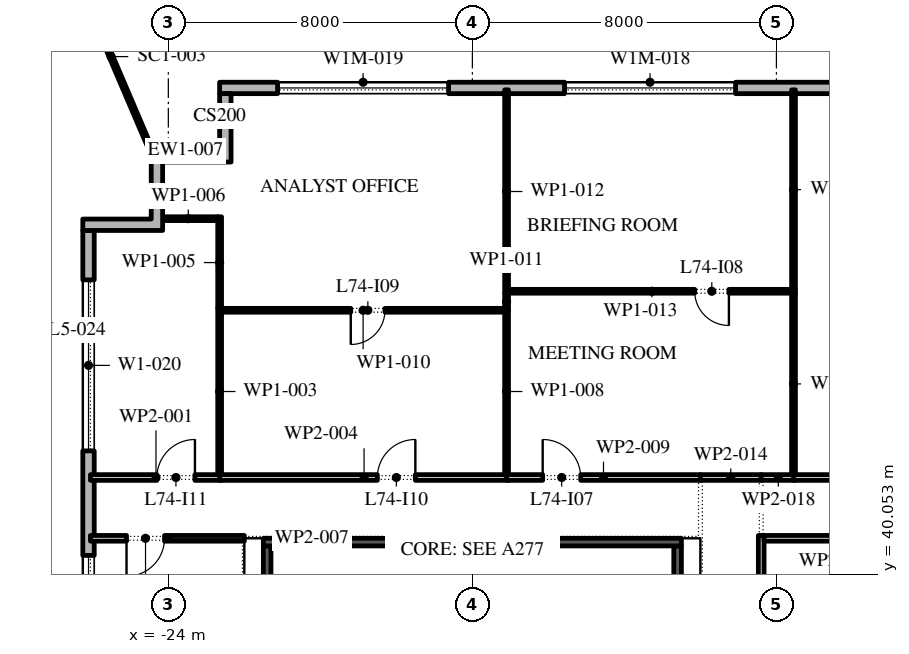
"""IFC4 building model, lengths in metres.
Left out: names, types, materials, properties, quantities, classifications, styles, units other than length and angle.
Written with IfcOpenShell. Run it as: python <this file> out.ifc"""

import sys

from ifc_helpers import new_model, si_unit, direction, frame, frame_2d, origin, place, context, subcontext, project, spatial, polyline, rectangle, outline, extrude, element, fill, save


model = new_model("IFC4")
c1 = context("Model", 3, precision=1e-05, world=origin(), true_north=direction((0.0, 1.0)))
c2 = subcontext(c1, "Body", "Model", "MODEL_VIEW")
j1 = project(units=[si_unit("LENGTHUNIT", "METRE"), si_unit("PLANEANGLEUNIT", "RADIAN")], contexts=[c1])
p1 = place(None, origin())
s1 = spatial("IfcSite", under=j1, at=p1, CompositionType="ELEMENT")
p2 = place(p1, origin())
s2 = spatial("IfcBuilding", under=s1, at=p2, CompositionType="ELEMENT")
p3 = place(p2, frame((0.0, 0.0, 338.4)))
s3 = spatial("IfcBuildingStorey", under=s2, at=p3, CompositionType="ELEMENT", Elevation=338.4)
p4 = place(p3, frame((22.35, 52.85, 0.0), z_axis=(0.0, 0.0, 1.0), x_axis=(-1.0, 0.0, 0.0)))
e1 = element("IfcWall", 1, at=p4, inside=s3, PredefinedType="STANDARD", context=c2, shape_type="SweptSolid", body=[
    extrude(rectangle(XDim=45.0, YDim=0.3, at=frame_2d((22.5, 0.0))), origin(), (0.0, 0.0, 1.0), 4.0),
])
p5 = place(p4, frame((1.375, 0.0, 0.45)))
e2 = element("IfcOpeningElement", 2, at=p5, cuts=e1, PredefinedType="OPENING", context=c2, shape_type="SweptSolid", body=[
    extrude(rectangle(XDim=4.5, YDim=2.575, at=frame_2d((2.25, 1.288))), frame((0.0, 0.16, 0.0), z_axis=(0.0, -1.0, 0.0), x_axis=(1.0, 0.0, 0.0)), (0.0, 0.0, 1.0), 0.32),
])
p6 = place(p4, frame((8.775, 0.0, 0.45)))
e3 = element("IfcOpeningElement", 3, at=p6, cuts=e1, PredefinedType="OPENING", context=c2, shape_type="SweptSolid", body=[
    extrude(rectangle(XDim=4.5, YDim=2.575, at=frame_2d((2.25, 1.288))), frame((0.0, 0.16, 0.0), z_axis=(0.0, -1.0, 0.0), x_axis=(1.0, 0.0, 0.0)), (0.0, 0.0, 1.0), 0.32),
])
p7 = place(p4, frame((17.375, 0.0, 0.0)))
e4 = element("IfcOpeningElement", 4, at=p7, cuts=e1, PredefinedType="OPENING", context=c2, shape_type="SweptSolid", body=[
    extrude(rectangle(XDim=2.4, YDim=3.025, at=frame_2d((1.2, 1.512))), frame((0.0, 0.16, 0.0), z_axis=(0.0, -1.0, 0.0), x_axis=(1.0, 0.0, 0.0)), (0.0, 0.0, 1.0), 0.32),
])
p8 = place(p4, frame((23.875, 0.0, 0.45)))
e5 = element("IfcOpeningElement", 5, at=p8, cuts=e1, PredefinedType="OPENING", context=c2, shape_type="SweptSolid", body=[
    extrude(rectangle(XDim=4.5, YDim=2.575, at=frame_2d((2.25, 1.288))), frame((0.0, 0.16, 0.0), z_axis=(0.0, -1.0, 0.0), x_axis=(1.0, 0.0, 0.0)), (0.0, 0.0, 1.0), 0.32),
])
p9 = place(p4, frame((31.425, 0.0, 0.45)))
e6 = element("IfcOpeningElement", 6, at=p9, cuts=e1, PredefinedType="OPENING", context=c2, shape_type="SweptSolid", body=[
    extrude(rectangle(XDim=4.5, YDim=2.575, at=frame_2d((2.25, 1.288))), frame((0.0, 0.16, 0.0), z_axis=(0.0, -1.0, 0.0), x_axis=(1.0, 0.0, 0.0)), (0.0, 0.0, 1.0), 0.32),
])
p10 = place(p4, frame((38.975, 0.0, 0.45)))
e7 = element("IfcOpeningElement", 7, at=p10, cuts=e1, PredefinedType="OPENING", context=c2, shape_type="SweptSolid", body=[
    extrude(rectangle(XDim=4.5, YDim=2.575, at=frame_2d((2.25, 1.288))), frame((0.0, 0.16, 0.0), z_axis=(0.0, -1.0, 0.0), x_axis=(1.0, 0.0, 0.0)), (0.0, 0.0, 1.0), 0.32),
])
p11 = place(p3, frame((-26.1, 49.1, 0.0), z_axis=(0.0, 0.0, 1.0), x_axis=(0.0, -1.0, 0.0)))
e8 = element("IfcWall", 8, at=p11, inside=s3, PredefinedType="STANDARD", context=c2, shape_type="SweptSolid", body=[
    extrude(rectangle(XDim=51.5, YDim=0.3, at=frame_2d((25.75, 0.0))), origin(), (0.0, 0.0, 1.0), 4.0),
])
p12 = place(p11, frame((1.3, 0.0, 0.45)))
e9 = element("IfcOpeningElement", 9, at=p12, cuts=e8, PredefinedType="OPENING", context=c2, shape_type="SweptSolid", body=[
    extrude(rectangle(XDim=4.5, YDim=3.05, at=frame_2d((2.25, 1.525))), frame((0.0, 0.16, 0.0), z_axis=(0.0, -1.0, 0.0), x_axis=(1.0, 0.0, 0.0)), (0.0, 0.0, 1.0), 0.32),
])
p13 = place(p11, frame((8.55, 0.0, 0.45)))
e10 = element("IfcOpeningElement", 10, at=p13, cuts=e8, PredefinedType="OPENING", context=c2, shape_type="SweptSolid", body=[
    extrude(rectangle(XDim=4.5, YDim=3.05, at=frame_2d((2.25, 1.525))), frame((0.0, 0.16, 0.0), z_axis=(0.0, -1.0, 0.0), x_axis=(1.0, 0.0, 0.0)), (0.0, 0.0, 1.0), 0.32),
])
p14 = place(p11, frame((17.0, 0.0, 0.0)))
e11 = element("IfcOpeningElement", 11, at=p14, cuts=e8, PredefinedType="OPENING", context=c2, shape_type="SweptSolid", body=[
    extrude(rectangle(XDim=2.4, YDim=3.5, at=frame_2d((1.2, 1.75))), frame((0.0, 0.16, 0.0), z_axis=(0.0, -1.0, 0.0), x_axis=(1.0, 0.0, 0.0)), (0.0, 0.0, 1.0), 0.32),
])
p15 = place(p11, frame((23.35, 0.0, 0.45)))
e12 = element("IfcOpeningElement", 12, at=p15, cuts=e8, PredefinedType="OPENING", context=c2, shape_type="SweptSolid", body=[
    extrude(rectangle(XDim=4.5, YDim=3.05, at=frame_2d((2.25, 1.525))), frame((0.0, 0.16, 0.0), z_axis=(0.0, -1.0, 0.0), x_axis=(1.0, 0.0, 0.0)), (0.0, 0.0, 1.0), 0.32),
])
p16 = place(p11, frame((30.75, 0.0, 0.45)))
e13 = element("IfcOpeningElement", 13, at=p16, cuts=e8, PredefinedType="OPENING", context=c2, shape_type="SweptSolid", body=[
    extrude(rectangle(XDim=4.5, YDim=3.05, at=frame_2d((2.25, 1.525))), frame((0.0, 0.16, 0.0), z_axis=(0.0, -1.0, 0.0), x_axis=(1.0, 0.0, 0.0)), (0.0, 0.0, 1.0), 0.32),
])
p17 = place(p11, frame((38.15, 0.0, 0.45)))
e14 = element("IfcOpeningElement", 14, at=p17, cuts=e8, PredefinedType="OPENING", context=c2, shape_type="SweptSolid", body=[
    extrude(rectangle(XDim=4.5, YDim=3.05, at=frame_2d((2.25, 1.525))), frame((0.0, 0.16, 0.0), z_axis=(0.0, -1.0, 0.0), x_axis=(1.0, 0.0, 0.0)), (0.0, 0.0, 1.0), 0.32),
])
p18 = place(p11, frame((46.6, 0.0, 0.0)))
e15 = element("IfcOpeningElement", 15, at=p18, cuts=e8, PredefinedType="OPENING", context=c2, shape_type="SweptSolid", body=[
    extrude(rectangle(XDim=2.4, YDim=3.5, at=frame_2d((1.2, 1.75))), frame((0.0, 0.16, 0.0), z_axis=(0.0, -1.0, 0.0), x_axis=(1.0, 0.0, 0.0)), (0.0, 0.0, 1.0), 0.32),
])
p19 = place(p3, origin())
e16 = element("IfcWall", 16, at=p19, inside=s3, PredefinedType="STANDARD", context=c2, shape_type="SweptSolid", body=[
    extrude(outline(polyline([(-24.45, 49.4), (-24.45, 51.2), (-22.65, 51.2), (-22.65, 52.7), (-22.35, 52.7), (-22.35, 50.9), (-24.15, 50.9), (-24.15, 49.1), (-26.25, 49.1), (-26.25, 49.4), (-24.45, 49.4)])), origin(), (0.0, 0.0, 1.0), 4.0),
])
p20 = place(p3, frame((-24.45, 51.2, -0.05), z_axis=(0.0, 0.0, 1.0), x_axis=(-0.392867927022, 0.919594906422, 0.0)))
e17 = element("IfcWall", 17, at=p20, inside=s3, PredefinedType="STANDARD", context=c2, shape_type="SweptSolid", body=[
    extrude(rectangle(XDim=5.382, YDim=0.1, at=frame_2d((2.691, 0.0))), origin(), (0.0, 0.0, 1.0), 4.05),
])
p21 = place(p3, frame((-21.4, 25.75, 0.0), z_axis=(0.0, 0.0, 1.0), x_axis=(0.0, 1.0, 0.0)))
e18 = element("IfcWall", 18, at=p21, inside=s3, PredefinedType="SHEAR", context=c2, shape_type="SweptSolid", body=[
    extrude(rectangle(XDim=15.05, YDim=0.2, at=frame_2d((7.525, 0.0))), origin(), (0.0, 0.0, 1.0), 4.0),
])
p22 = place(p3, frame((-10.6, 25.75, 0.0), z_axis=(0.0, 0.0, 1.0), x_axis=(0.0, 1.0, 0.0)))
e19 = element("IfcWall", 19, at=p22, inside=s3, PredefinedType="SHEAR", context=c2, shape_type="SweptSolid", body=[
    extrude(rectangle(XDim=15.05, YDim=0.2, at=frame_2d((7.525, 0.0))), origin(), (0.0, 0.0, 1.0), 4.0),
])
p23 = place(p22, frame((7.075, 0.0, 0.0)))
e20 = element("IfcOpeningElement", 20, at=p23, cuts=e19, PredefinedType="OPENING", context=c2, shape_type="SweptSolid", body=[
    extrude(rectangle(XDim=0.9, YDim=2.1, at=frame_2d((0.45, 1.05))), frame((0.0, 0.11, 0.0), z_axis=(0.0, -1.0, 0.0), x_axis=(1.0, 0.0, 0.0)), (0.0, 0.0, 1.0), 0.22),
])
p24 = place(p3, frame((-21.5, 40.9, 0.0), z_axis=(0.0, 0.0, 1.0), x_axis=(1.0, 0.0, 0.0)))
e21 = element("IfcWall", 21, at=p24, inside=s3, PredefinedType="SHEAR", context=c2, shape_type="SweptSolid", body=[
    extrude(rectangle(XDim=11.0, YDim=0.2, at=frame_2d((5.5, 0.0))), origin(), (0.0, 0.0, 1.0), 4.0),
])
p25 = place(p3, frame((-26.05, 42.6, 0.0), z_axis=(0.0, 0.0, 1.0), x_axis=(1.0, 0.0, 0.0)))
e22 = element("IfcWall", 22, at=p25, inside=s3, PredefinedType="PARTITIONING", context=c2, shape_type="SweptSolid", body=[
    extrude(rectangle(XDim=3.45, YDim=0.15, at=frame_2d((1.725, 0.0))), origin(), (0.0, 0.0, 1.0), 4.0),
])
p26 = place(p25, frame((1.75, 0.0, 0.0)))
e23 = element("IfcOpeningElement", 23, at=p26, cuts=e22, PredefinedType="OPENING", context=c2, shape_type="SweptSolid", body=[
    extrude(rectangle(XDim=1.0, YDim=2.1, at=frame_2d((0.5, 1.05))), frame((0.0, 0.085, 0.0), z_axis=(0.0, -1.0, 0.0), x_axis=(1.0, 0.0, 0.0)), (0.0, 0.0, 1.0), 0.17),
])
p27 = place(p3, frame((-22.65, 42.675, 0.0), z_axis=(0.0, 0.0, 1.0), x_axis=(0.0, 1.0, 0.0)))
e24 = element("IfcWall", 24, at=p27, inside=s3, PredefinedType="PARTITIONING", context=c2, shape_type="SweptSolid", body=[
    extrude(rectangle(XDim=4.375, YDim=0.1, at=frame_2d((2.188, 0.0))), origin(), (0.0, 0.0, 1.0), 4.0),
])
p28 = place(p3, frame((-22.65, 42.6, 0.0), z_axis=(0.0, 0.0, 1.0), x_axis=(1.0, 0.0, 0.0)))
e25 = element("IfcWall", 25, at=p28, inside=s3, PredefinedType="PARTITIONING", context=c2, shape_type="SweptSolid", body=[
    extrude(rectangle(XDim=7.6, YDim=0.15, at=frame_2d((3.8, 0.0))), origin(), (0.0, 0.0, 1.0), 4.0),
])
p29 = place(p28, frame((4.15, 0.0, 0.0)))
e26 = element("IfcOpeningElement", 26, at=p29, cuts=e25, PredefinedType="OPENING", context=c2, shape_type="SweptSolid", body=[
    extrude(rectangle(XDim=1.0, YDim=2.1, at=frame_2d((0.5, 1.05))), frame((0.0, 0.085, 0.0), z_axis=(0.0, -1.0, 0.0), x_axis=(1.0, 0.0, 0.0)), (0.0, 0.0, 1.0), 0.17),
])
p30 = place(p3, frame((-22.65, 47.05, 0.0), z_axis=(0.0, 0.0, 1.0), x_axis=(0.0, 1.0, 0.0)))
e27 = element("IfcWall", 27, at=p30, inside=s3, PredefinedType="PARTITIONING", context=c2, shape_type="SweptSolid", body=[
    extrude(rectangle(XDim=2.41, YDim=0.1, at=frame_2d((1.205, 0.0))), origin(), (0.0, 0.0, 1.0), 4.0),
])
p31 = place(p3, frame((-22.7, 49.41, 0.0), z_axis=(0.0, 0.0, 1.0), x_axis=(-1.0, 0.0, 0.0)))
e28 = element("IfcWall", 28, at=p31, inside=s3, PredefinedType="PARTITIONING", context=c2, shape_type="SweptSolid", body=[
    extrude(rectangle(XDim=1.55, YDim=0.1, at=frame_2d((0.775, 0.0))), origin(), (0.0, 0.0, 1.0), 4.0),
])
p32 = place(p3, frame((-22.0, 41.0, 0.0), z_axis=(0.0, 0.0, 1.0), x_axis=(-1.0, 0.0, 0.0)))
e29 = element("IfcWall", 29, at=p32, inside=s3, PredefinedType="PARTITIONING", context=c2, shape_type="SweptSolid", body=[
    extrude(rectangle(XDim=4.05, YDim=0.15, at=frame_2d((2.025, 0.0))), origin(), (0.0, 0.0, 1.0), 4.0),
])
p33 = place(p32, frame((2.1, 0.0, 0.0)))
e30 = element("IfcOpeningElement", 30, at=p33, cuts=e29, PredefinedType="OPENING", context=c2, shape_type="SweptSolid", body=[
    extrude(rectangle(XDim=1.0, YDim=2.1, at=frame_2d((0.5, 1.05))), frame((0.0, 0.085, 0.0), z_axis=(0.0, -1.0, 0.0), x_axis=(1.0, 0.0, 0.0)), (0.0, 0.0, 1.0), 0.17),
])
p34 = place(p3, frame((-15.1, 42.675, 0.0), z_axis=(0.0, 0.0, 1.0), x_axis=(0.0, 1.0, 0.0)))
e31 = element("IfcWall", 31, at=p34, inside=s3, PredefinedType="PARTITIONING", context=c2, shape_type="SweptSolid", body=[
    extrude(rectangle(XDim=4.375, YDim=0.1, at=frame_2d((2.188, 0.0))), origin(), (0.0, 0.0, 1.0), 4.0),
])
p35 = place(p3, frame((-15.1, 42.6, 0.0), z_axis=(0.0, 0.0, 1.0), x_axis=(1.0, 0.0, 0.0)))
e32 = element("IfcWall", 32, at=p35, inside=s3, PredefinedType="PARTITIONING", context=c2, shape_type="SweptSolid", body=[
    extrude(rectangle(XDim=5.1, YDim=0.15, at=frame_2d((2.55, 0.0))), origin(), (0.0, 0.0, 1.0), 4.0),
])
p36 = place(p35, frame((0.95, 0.0, 0.0)))
e33 = element("IfcOpeningElement", 33, at=p36, cuts=e32, PredefinedType="OPENING", context=c2, shape_type="SweptSolid", body=[
    extrude(rectangle(XDim=1.0, YDim=2.1, at=frame_2d((0.5, 1.05))), frame((0.0, 0.085, 0.0), z_axis=(0.0, -1.0, 0.0), x_axis=(1.0, 0.0, 0.0)), (0.0, 0.0, 1.0), 0.17),
])
p37 = place(p3, frame((-15.15, 47.0, 0.0), z_axis=(0.0, 0.0, 1.0), x_axis=(-1.0, 0.0, 0.0)))
e34 = element("IfcWall", 34, at=p37, inside=s3, PredefinedType="PARTITIONING", context=c2, shape_type="SweptSolid", body=[
    extrude(rectangle(XDim=7.45, YDim=0.1, at=frame_2d((3.725, 0.0))), origin(), (0.0, 0.0, 1.0), 4.0),
])
p38 = place(p37, frame((3.15, 0.0, 0.0)))
e35 = element("IfcOpeningElement", 35, at=p38, cuts=e34, PredefinedType="OPENING", context=c2, shape_type="SweptSolid", body=[
    extrude(rectangle(XDim=0.9, YDim=2.1, at=frame_2d((0.45, 1.05))), frame((0.0, 0.06, 0.0), z_axis=(0.0, -1.0, 0.0), x_axis=(1.0, 0.0, 0.0)), (0.0, 0.0, 1.0), 0.12),
])
p39 = place(p3, frame((-15.1, 47.0, 0.0), z_axis=(0.0, 0.0, 1.0), x_axis=(0.0, 1.0, 0.0)))
e36 = element("IfcWall", 36, at=p39, inside=s3, PredefinedType="PARTITIONING", context=c2, shape_type="SweptSolid", body=[
    extrude(rectangle(XDim=0.45, YDim=0.1, at=frame_2d((0.225, 0.0))), origin(), (0.0, 0.0, 1.0), 4.0),
])
p40 = place(p3, frame((-15.1, 47.45, 0.0), z_axis=(0.0, 0.0, 1.0), x_axis=(0.0, 1.0, 0.0)))
e37 = element("IfcWall", 37, at=p40, inside=s3, PredefinedType="PARTITIONING", context=c2, shape_type="SweptSolid", body=[
    extrude(rectangle(XDim=5.35, YDim=0.1, at=frame_2d((2.675, 0.0))), origin(), (0.0, 0.0, 1.0), 4.0),
])
p41 = place(p3, frame((-15.05, 47.5, 0.0), z_axis=(0.0, 0.0, 1.0), x_axis=(1.0, 0.0, 0.0)))
e38 = element("IfcWall", 38, at=p41, inside=s3, PredefinedType="PARTITIONING", context=c2, shape_type="SweptSolid", body=[
    extrude(rectangle(XDim=7.55, YDim=0.1, at=frame_2d((3.775, 0.0))), origin(), (0.0, 0.0, 1.0), 4.0),
])
p42 = place(p41, frame((4.9, 0.0, 0.0)))
e39 = element("IfcOpeningElement", 39, at=p42, cuts=e38, PredefinedType="OPENING", context=c2, shape_type="SweptSolid", body=[
    extrude(rectangle(XDim=0.9, YDim=2.1, at=frame_2d((0.45, 1.05))), frame((0.0, 0.06, 0.0), z_axis=(0.0, -1.0, 0.0), x_axis=(1.0, 0.0, 0.0)), (0.0, 0.0, 1.0), 0.12),
])
p43 = place(p3, frame((-10.0, 42.6, 0.0), z_axis=(0.0, 0.0, 1.0), x_axis=(1.0, 0.0, 0.0)))
e40 = element("IfcWall", 40, at=p43, inside=s3, PredefinedType="PARTITIONING", context=c2, shape_type="SweptSolid", body=[
    extrude(rectangle(XDim=1.6, YDim=0.15, at=frame_2d((0.8, 0.0))), origin(), (0.0, 0.0, 1.0), 4.0),
])
p44 = place(p3, frame((-8.4, 41.075, 0.0), z_axis=(0.0, 0.0, 1.0), x_axis=(0.0, -1.0, 0.0)))
e41 = element("IfcWall", 41, at=p44, inside=s3, PredefinedType="PARTITIONING", context=c2, shape_type="SweptSolid", body=[
    extrude(rectangle(XDim=9.025, YDim=0.15, at=frame_2d((4.512, 0.0))), origin(), (0.0, 0.0, 1.0), 4.0),
])
p45 = place(p44, frame((2.175, 0.0, 0.0)))
e42 = element("IfcOpeningElement", 42, at=p45, cuts=e41, PredefinedType="OPENING", context=c2, shape_type="SweptSolid", body=[
    extrude(rectangle(XDim=1.0, YDim=2.1, at=frame_2d((0.5, 1.05))), frame((0.0, 0.085, 0.0), z_axis=(0.0, -1.0, 0.0), x_axis=(1.0, 0.0, 0.0)), (0.0, 0.0, 1.0), 0.17),
])
p46 = place(p3, frame((-8.4, 42.6, 0.0), z_axis=(0.0, 0.0, 1.0), x_axis=(1.0, 0.0, 0.0)))
e43 = element("IfcWall", 43, at=p46, inside=s3, PredefinedType="PARTITIONING", context=c2, shape_type="SweptSolid", body=[
    extrude(rectangle(XDim=0.9, YDim=0.15, at=frame_2d((0.45, 0.0))), origin(), (0.0, 0.0, 1.0), 4.0),
])
p47 = place(p3, frame((-7.55, 42.675, 0.0), z_axis=(0.0, 0.0, 1.0), x_axis=(0.0, 1.0, 0.0)))
e44 = element("IfcWall", 44, at=p47, inside=s3, PredefinedType="PARTITIONING", context=c2, shape_type="SweptSolid", body=[
    extrude(rectangle(XDim=4.775, YDim=0.1, at=frame_2d((2.387, 0.0))), origin(), (0.0, 0.0, 1.0), 3.164),
])
p48 = place(p3, frame((-7.55, 42.6, 0.0), z_axis=(0.0, 0.0, 1.0), x_axis=(1.0, 0.0, 0.0)))
e45 = element("IfcWall", 45, at=p48, inside=s3, PredefinedType="PARTITIONING", context=c2, shape_type="SweptSolid", body=[
    extrude(rectangle(XDim=7.5, YDim=0.15, at=frame_2d((3.75, 0.0))), origin(), (0.0, 0.0, 1.0), 4.0),
])
p49 = place(p48, frame((1.65, 0.0, 0.0)))
e46 = element("IfcOpeningElement", 46, at=p49, cuts=e45, PredefinedType="OPENING", context=c2, shape_type="SweptSolid", body=[
    extrude(rectangle(XDim=1.0, YDim=2.1, at=frame_2d((0.5, 1.05))), frame((0.0, 0.085, 0.0), z_axis=(0.0, -1.0, 0.0), x_axis=(1.0, 0.0, 0.0)), (0.0, 0.0, 1.0), 0.17),
])
p50 = place(p3, frame((-7.55, 47.55, 0.0), z_axis=(0.0, 0.0, 1.0), x_axis=(0.0, 1.0, 0.0)))
e47 = element("IfcWall", 47, at=p50, inside=s3, PredefinedType="PARTITIONING", context=c2, shape_type="SweptSolid", body=[
    extrude(rectangle(XDim=5.25, YDim=0.1, at=frame_2d((2.625, 0.0))), origin(), (0.0, 0.0, 1.0), 3.164),
])
p51 = place(p3, frame((-4.55, 41.0, 0.0), z_axis=(0.0, 0.0, 1.0), x_axis=(-1.0, 0.0, 0.0)))
e48 = element("IfcWall", 48, at=p51, inside=s3, PredefinedType="PARTITIONING", context=c2, shape_type="SweptSolid", body=[
    extrude(rectangle(XDim=3.775, YDim=0.15, at=frame_2d((1.887, 0.0))), origin(), (0.0, 0.0, 1.0), 4.0),
])
p52 = place(p9, origin())
e49 = element("IfcWindow", 49, at=p52, inside=s3, PartitioningType="DOUBLE_PANEL_VERTICAL", PredefinedType="WINDOW", context=c2, shape_type="SweptSolid", body=[
    extrude(rectangle(XDim=4.5, YDim=2.575, at=frame_2d((2.25, 1.288))), frame((0.0, 0.03, 0.0), z_axis=(0.0, -1.0, 0.0), x_axis=(1.0, 0.0, 0.0)), (0.0, 0.0, 1.0), 0.06),
])
fill(e6, e49)
p53 = place(p10, origin())
e50 = element("IfcWindow", 50, at=p53, inside=s3, PartitioningType="DOUBLE_PANEL_VERTICAL", PredefinedType="WINDOW", context=c2, shape_type="SweptSolid", body=[
    extrude(rectangle(XDim=4.5, YDim=2.575, at=frame_2d((2.25, 1.288))), frame((0.0, 0.03, 0.0), z_axis=(0.0, -1.0, 0.0), x_axis=(1.0, 0.0, 0.0)), (0.0, 0.0, 1.0), 0.06),
])
fill(e7, e50)
p54 = place(p12, origin())
e51 = element("IfcWindow", 51, at=p54, inside=s3, PartitioningType="DOUBLE_PANEL_VERTICAL", PredefinedType="WINDOW", context=c2, shape_type="SweptSolid", body=[
    extrude(rectangle(XDim=4.5, YDim=3.05, at=frame_2d((2.25, 1.525))), frame((0.0, 0.03, 0.0), z_axis=(0.0, -1.0, 0.0), x_axis=(1.0, 0.0, 0.0)), (0.0, 0.0, 1.0), 0.06),
])
fill(e9, e51)
p55 = place(p13, origin())
e52 = element("IfcWindow", 52, at=p55, inside=s3, PartitioningType="DOUBLE_PANEL_VERTICAL", PredefinedType="WINDOW", context=c2, shape_type="SweptSolid", body=[
    extrude(rectangle(XDim=4.5, YDim=3.05, at=frame_2d((2.25, 1.525))), frame((0.0, 0.03, 0.0), z_axis=(0.0, -1.0, 0.0), x_axis=(1.0, 0.0, 0.0)), (0.0, 0.0, 1.0), 0.06),
])
fill(e10, e52)
p56 = place(p36, origin())
e53 = element("IfcDoor", 53, at=p56, inside=s3, OperationType="SINGLE_SWING_RIGHT", PredefinedType="DOOR", context=c2, shape_type="SweptSolid", body=[
    extrude(rectangle(XDim=1.0, YDim=2.1, at=frame_2d((0.5, 1.05))), frame((0.0, 0.025, 0.0), z_axis=(0.0, -1.0, 0.0), x_axis=(1.0, 0.0, 0.0)), (0.0, 0.0, 1.0), 0.05),
])
fill(e33, e53)
p57 = place(p42, frame((0.9, 0.0, 0.0), z_axis=(0.0, 0.0, 1.0), x_axis=(-1.0, 0.0, 0.0)))
e54 = element("IfcDoor", 54, at=p57, inside=s3, OperationType="SINGLE_SWING_RIGHT", PredefinedType="DOOR", context=c2, shape_type="SweptSolid", body=[
    extrude(rectangle(XDim=0.9, YDim=2.1, at=frame_2d((0.45, 1.05))), frame((0.0, 0.025, 0.0), z_axis=(0.0, -1.0, 0.0), x_axis=(1.0, 0.0, 0.0)), (0.0, 0.0, 1.0), 0.05),
])
fill(e39, e54)
p58 = place(p38, origin())
e55 = element("IfcDoor", 55, at=p58, inside=s3, OperationType="SINGLE_SWING_LEFT", PredefinedType="DOOR", context=c2, shape_type="SweptSolid", body=[
    extrude(rectangle(XDim=0.9, YDim=2.1, at=frame_2d((0.45, 1.05))), frame((0.0, 0.025, 0.0), z_axis=(0.0, -1.0, 0.0), x_axis=(1.0, 0.0, 0.0)), (0.0, 0.0, 1.0), 0.05),
])
fill(e35, e55)
p59 = place(p29, origin())
e56 = element("IfcDoor", 56, at=p59, inside=s3, OperationType="SINGLE_SWING_LEFT", PredefinedType="DOOR", context=c2, shape_type="SweptSolid", body=[
    extrude(rectangle(XDim=1.0, YDim=2.1, at=frame_2d((0.5, 1.05))), frame((0.0, 0.025, 0.0), z_axis=(0.0, -1.0, 0.0), x_axis=(1.0, 0.0, 0.0)), (0.0, 0.0, 1.0), 0.05),
])
fill(e26, e56)
p60 = place(p26, origin())
e57 = element("IfcDoor", 57, at=p60, inside=s3, OperationType="SINGLE_SWING_LEFT", PredefinedType="DOOR", context=c2, shape_type="SweptSolid", body=[
    extrude(rectangle(XDim=1.0, YDim=2.1, at=frame_2d((0.5, 1.05))), frame((0.0, 0.025, 0.0), z_axis=(0.0, -1.0, 0.0), x_axis=(1.0, 0.0, 0.0)), (0.0, 0.0, 1.0), 0.05),
])
fill(e23, e57)
p61 = place(p33, origin())
e58 = element("IfcDoor", 58, at=p61, inside=s3, OperationType="SINGLE_SWING_LEFT", PredefinedType="DOOR", context=c2, shape_type="SweptSolid", body=[
    extrude(rectangle(XDim=1.0, YDim=2.1, at=frame_2d((0.5, 1.05))), frame((0.0, 0.025, 0.0), z_axis=(0.0, -1.0, 0.0), x_axis=(1.0, 0.0, 0.0)), (0.0, 0.0, 1.0), 0.05),
])
fill(e30, e58)
save(model, sys.argv[1])
